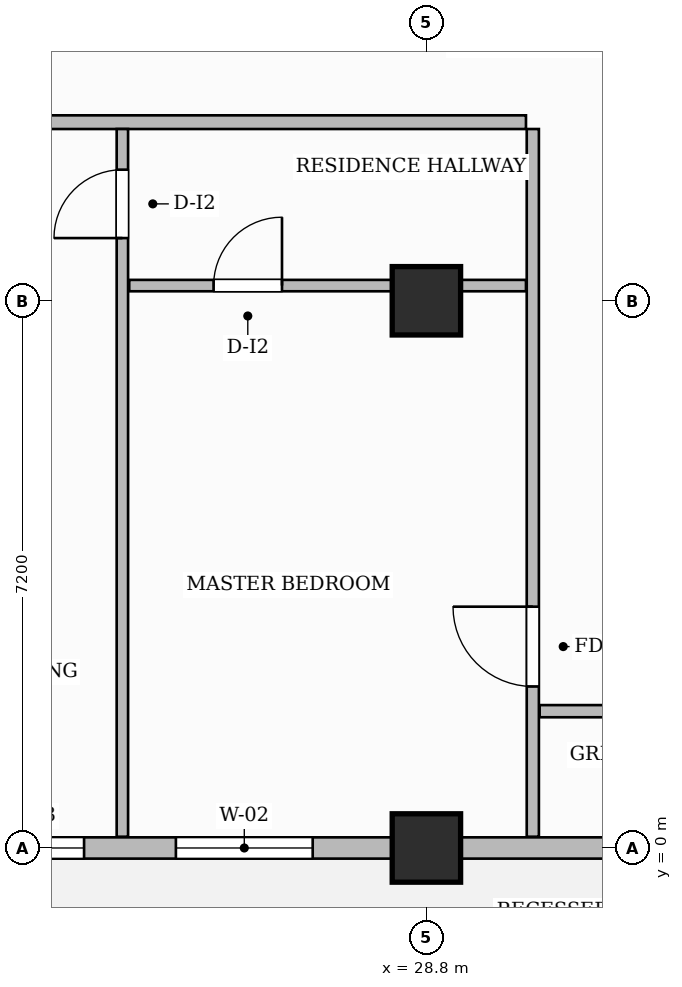
"""IFC4 building model, lengths in metres.
Left out: names, types, materials, properties, quantities, classifications, styles, units other than length and angle.
Written with IfcOpenShell. Run it as: python <this file> out.ifc"""

import sys

from ifc_helpers import new_model, si_unit, direction, frame, frame_2d, origin, origin_2d, place, context, subcontext, project, spatial, rectangle, extrude, source, transform, mapped, element, fill, save


model = new_model("IFC4")
c1 = context("Model", 3, precision=1e-05, world=origin(), true_north=direction((0.0, 1.0)))
c2 = subcontext(c1, "Body", "Model", "MODEL_VIEW")
j1 = project(units=[si_unit("LENGTHUNIT", "METRE"), si_unit("PLANEANGLEUNIT", "RADIAN")], contexts=[c1])
p1 = place(None, origin())
s1 = spatial("IfcSite", under=j1, at=p1, CompositionType="ELEMENT")
p2 = place(p1, origin())
s2 = spatial("IfcBuilding", under=s1, at=p2, CompositionType="ELEMENT")
p3 = place(p2, frame((0.0, 0.0, 244.25)))
s3 = spatial("IfcBuildingStorey", under=s2, at=p3, CompositionType="ELEMENT", Elevation=244.25)
m1 = source(origin(), c2, "Body", "SweptSolid", [
    extrude(rectangle(XDim=0.9, YDim=0.9, at=origin_2d()), origin(), (0.0, 0.0, 1.0), 3.85),
])
for number, where, z_axis, x_axis in (
    (1, (28.8, 0.0, 0.0), (0.0, 0.0, 1.0), (1.0, 0.0, 0.0)),
    (2, (28.8, 7.2, 0.0), (0.0, 0.0, 1.0), (1.0, 0.0, 0.0)),
):
    element("IfcColumn", number, at=place(p3, frame(where, z_axis=z_axis, x_axis=x_axis)), inside=s3, PredefinedType="COLUMN", context=c2, shape_type="MappedRepresentation", body=[
        mapped(m1, transform((0.0, 0.0, 0.0), scale=1.0)),
    ])
p4 = place(p3, frame((14.548, 9.55, 0.0), z_axis=(0.0, 0.0, 1.0), x_axis=(1.0, 0.0, 0.0)))
e3 = element("IfcWall", 3, at=p4, inside=s3, PredefinedType="PARTITIONING", context=c2, shape_type="SweptSolid", body=[
    extrude(rectangle(XDim=15.562, YDim=0.18, at=frame_2d((7.781, 0.0))), origin(), (0.0, 0.0, 1.0), 3.6),
])
p5 = place(p4, frame((2.908, 0.0, 0.0)))
e4 = element("IfcOpeningElement", 4, at=p5, cuts=e3, PredefinedType="OPENING", context=c2, shape_type="SweptSolid", body=[
    extrude(rectangle(XDim=1.0, YDim=2.2, at=frame_2d((0.5, 1.1))), frame((0.0, 0.1, 0.0), z_axis=(0.0, -1.0, 0.0), x_axis=(1.0, 0.0, 0.0)), (0.0, 0.0, 1.0), 0.2),
])
p6 = place(p4, frame((8.232, 0.0, 0.0)))
e5 = element("IfcOpeningElement", 5, at=p6, cuts=e3, PredefinedType="OPENING", context=c2, shape_type="SweptSolid", body=[
    extrude(rectangle(XDim=1.05, YDim=2.25, at=frame_2d((0.525, 1.125))), frame((0.0, 0.1, 0.0), z_axis=(0.0, -1.0, 0.0), x_axis=(1.0, 0.0, 0.0)), (0.0, 0.0, 1.0), 0.2),
])
p7 = place(p3, frame((30.2, 0.148, 0.0), z_axis=(0.0, 0.0, 1.0), x_axis=(0.0, 1.0, 0.0)))
e6 = element("IfcWall", 6, at=p7, inside=s3, PredefinedType="PARTITIONING", context=c2, shape_type="SweptSolid", body=[
    extrude(rectangle(XDim=9.312, YDim=0.16, at=frame_2d((4.656, 0.0))), origin(), (0.0, 0.0, 1.0), 3.6),
])
p8 = place(p7, frame((1.977, 0.0, 0.0)))
e7 = element("IfcOpeningElement", 7, at=p8, cuts=e6, PredefinedType="OPENING", context=c2, shape_type="SweptSolid", body=[
    extrude(rectangle(XDim=1.05, YDim=2.15, at=frame_2d((0.525, 1.075))), frame((0.0, 0.09, 0.0), z_axis=(0.0, -1.0, 0.0), x_axis=(1.0, 0.0, 0.0)), (0.0, 0.0, 1.0), 0.18),
])
p9 = place(p3, frame((30.29, 1.8, 0.0), z_axis=(0.0, 0.0, 1.0), x_axis=(1.0, 0.0, 0.0)))
e8 = element("IfcWall", 8, at=p9, inside=s3, PredefinedType="PARTITIONING", context=c2, shape_type="SweptSolid", body=[
    extrude(rectangle(XDim=19.37, YDim=0.16, at=frame_2d((9.685, 0.0))), origin(), (0.0, 0.0, 1.0), 3.6),
])
p10 = place(p9, frame((9.735, 0.0, 0.0)))
e9 = element("IfcOpeningElement", 9, at=p10, cuts=e8, PredefinedType="OPENING", context=c2, shape_type="SweptSolid", body=[
    extrude(rectangle(XDim=0.95, YDim=2.15, at=frame_2d((0.475, 1.075))), frame((0.0, 0.09, 0.0), z_axis=(0.0, -1.0, 0.0), x_axis=(1.0, 0.0, 0.0)), (0.0, 0.0, 1.0), 0.18),
])
p11 = place(p3, frame((24.8, 0.148, 0.0), z_axis=(0.0, 0.0, 1.0), x_axis=(0.0, 1.0, 0.0)))
e10 = element("IfcWall", 10, at=p11, inside=s3, PredefinedType="PARTITIONING", context=c2, shape_type="SweptSolid", body=[
    extrude(rectangle(XDim=9.312, YDim=0.15, at=frame_2d((4.656, 0.0))), origin(), (0.0, 0.0, 1.0), 3.6),
])
p12 = place(p11, frame((7.877, 0.0, 0.0)))
e11 = element("IfcOpeningElement", 11, at=p12, cuts=e10, PredefinedType="OPENING", context=c2, shape_type="SweptSolid", body=[
    extrude(rectangle(XDim=0.9, YDim=2.15, at=frame_2d((0.45, 1.075))), frame((0.0, 0.085, 0.0), z_axis=(0.0, -1.0, 0.0), x_axis=(1.0, 0.0, 0.0)), (0.0, 0.0, 1.0), 0.17),
])
p13 = place(p3, frame((24.89, 7.4, 0.0), z_axis=(0.0, 0.0, 1.0), x_axis=(1.0, 0.0, 0.0)))
e12 = element("IfcWall", 12, at=p13, inside=s3, PredefinedType="PARTITIONING", context=c2, shape_type="SweptSolid", body=[
    extrude(rectangle(XDim=5.22, YDim=0.15, at=frame_2d((2.61, 0.0))), origin(), (0.0, 0.0, 1.0), 3.135),
])
p14 = place(p13, frame((1.11, 0.0, 0.0)))
e13 = element("IfcOpeningElement", 13, at=p14, cuts=e12, PredefinedType="OPENING", context=c2, shape_type="SweptSolid", body=[
    extrude(rectangle(XDim=0.9, YDim=2.15, at=frame_2d((0.45, 1.075))), frame((0.0, 0.085, 0.0), z_axis=(0.0, -1.0, 0.0), x_axis=(1.0, 0.0, 0.0)), (0.0, 0.0, 1.0), 0.17),
])
p15 = place(p3, frame((14.4, 0.0, 0.0), z_axis=(0.0, 0.0, 1.0), x_axis=(1.0, 0.0, 0.0)))
e14 = element("IfcWall", 14, at=p15, inside=s3, PredefinedType="SOLIDWALL", context=c2, shape_type="SweptSolid", body=[
    extrude(rectangle(XDim=35.4, YDim=0.28, at=frame_2d((17.7, 0.0))), origin(), (0.0, 0.0, 1.0), 3.135),
])
p16 = place(p15, frame((0.85, 0.0, 0.0)))
e15 = element("IfcOpeningElement", 15, at=p16, cuts=e14, PredefinedType="OPENING", context=c2, shape_type="SweptSolid", body=[
    extrude(rectangle(XDim=1.2, YDim=2.2, at=frame_2d((0.6, 1.1))), frame((0.0, 0.15, 0.0), z_axis=(0.0, -1.0, 0.0), x_axis=(1.0, 0.0, 0.0)), (0.0, 0.0, 1.0), 0.3),
])
p17 = place(p15, frame((2.811, 0.0, 0.8)))
e16 = element("IfcOpeningElement", 16, at=p17, cuts=e14, PredefinedType="OPENING", context=c2, shape_type="SweptSolid", body=[
    extrude(rectangle(XDim=1.8, YDim=1.85, at=frame_2d((0.9, 0.925))), frame((0.0, 0.15, 0.0), z_axis=(0.0, -1.0, 0.0), x_axis=(1.0, 0.0, 0.0)), (0.0, 0.0, 1.0), 0.3),
])
p18 = place(p15, frame((5.269, 0.0, 0.8)))
e17 = element("IfcOpeningElement", 17, at=p18, cuts=e14, PredefinedType="OPENING", context=c2, shape_type="SweptSolid", body=[
    extrude(rectangle(XDim=0.95, YDim=1.75, at=frame_2d((0.475, 0.875))), frame((0.0, 0.15, 0.0), z_axis=(0.0, -1.0, 0.0), x_axis=(1.0, 0.0, 0.0)), (0.0, 0.0, 1.0), 0.3),
])
p19 = place(p15, frame((8.496, 0.0, 0.8)))
e18 = element("IfcOpeningElement", 18, at=p19, cuts=e14, PredefinedType="OPENING", context=c2, shape_type="SweptSolid", body=[
    extrude(rectangle(XDim=1.4, YDim=1.85, at=frame_2d((0.7, 0.925))), frame((0.0, 0.15, 0.0), z_axis=(0.0, -1.0, 0.0), x_axis=(1.0, 0.0, 0.0)), (0.0, 0.0, 1.0), 0.3),
])
p20 = place(p15, frame((11.104, 0.0, 0.8)))
e19 = element("IfcOpeningElement", 19, at=p20, cuts=e14, PredefinedType="OPENING", context=c2, shape_type="SweptSolid", body=[
    extrude(rectangle(XDim=1.8, YDim=1.85, at=frame_2d((0.9, 0.925))), frame((0.0, 0.15, 0.0), z_axis=(0.0, -1.0, 0.0), x_axis=(1.0, 0.0, 0.0)), (0.0, 0.0, 1.0), 0.3),
])
p21 = place(p15, frame((16.804, 0.0, 0.8)))
e20 = element("IfcOpeningElement", 20, at=p21, cuts=e14, PredefinedType="OPENING", context=c2, shape_type="SweptSolid", body=[
    extrude(rectangle(XDim=1.8, YDim=1.85, at=frame_2d((0.9, 0.925))), frame((0.0, 0.15, 0.0), z_axis=(0.0, -1.0, 0.0), x_axis=(1.0, 0.0, 0.0)), (0.0, 0.0, 1.0), 0.3),
])
p22 = place(p15, frame((21.725, 0.0, 0.8)))
e21 = element("IfcOpeningElement", 21, at=p22, cuts=e14, PredefinedType="OPENING", context=c2, shape_type="SweptSolid", body=[
    extrude(rectangle(XDim=1.8, YDim=1.85, at=frame_2d((0.9, 0.925))), frame((0.0, 0.15, 0.0), z_axis=(0.0, -1.0, 0.0), x_axis=(1.0, 0.0, 0.0)), (0.0, 0.0, 1.0), 0.3),
])
p23 = place(p15, frame((24.475, 0.0, 0.8)))
e22 = element("IfcOpeningElement", 22, at=p23, cuts=e14, PredefinedType="OPENING", context=c2, shape_type="SweptSolid", body=[
    extrude(rectangle(XDim=1.8, YDim=1.85, at=frame_2d((0.9, 0.925))), frame((0.0, 0.15, 0.0), z_axis=(0.0, -1.0, 0.0), x_axis=(1.0, 0.0, 0.0)), (0.0, 0.0, 1.0), 0.3),
])
p24 = place(p15, frame((29.075, 0.0, 0.8)))
e23 = element("IfcOpeningElement", 23, at=p24, cuts=e14, PredefinedType="OPENING", context=c2, shape_type="SweptSolid", body=[
    extrude(rectangle(XDim=1.8, YDim=1.85, at=frame_2d((0.9, 0.925))), frame((0.0, 0.15, 0.0), z_axis=(0.0, -1.0, 0.0), x_axis=(1.0, 0.0, 0.0)), (0.0, 0.0, 1.0), 0.3),
])
p25 = place(p15, frame((32.125, 0.0, 0.8)))
e24 = element("IfcOpeningElement", 24, at=p25, cuts=e14, PredefinedType="OPENING", context=c2, shape_type="SweptSolid", body=[
    extrude(rectangle(XDim=1.8, YDim=1.85, at=frame_2d((0.9, 0.925))), frame((0.0, 0.15, 0.0), z_axis=(0.0, -1.0, 0.0), x_axis=(1.0, 0.0, 0.0)), (0.0, 0.0, 1.0), 0.3),
])
m2 = source(origin(), c2, "Body", "SweptSolid", [
    extrude(rectangle(XDim=1.05, YDim=2.15, at=frame_2d((0.525, 1.075))), frame((0.0, 0.025, 0.0), z_axis=(0.0, -1.0, 0.0), x_axis=(1.0, 0.0, 0.0)), (0.0, 0.0, 1.0), 0.05),
])
p26 = place(p8, origin())
e25 = element("IfcDoor", 25, at=p26, inside=s3, OperationType="SINGLE_SWING_RIGHT", PredefinedType="DOOR", context=c2, shape_type="MappedRepresentation", body=[
    mapped(m2, transform((0.0, 0.0, 0.0), scale=1.0)),
])
fill(e7, e25)
m3 = source(origin(), c2, "Body", "SweptSolid", [
    extrude(rectangle(XDim=0.9, YDim=2.15, at=frame_2d((0.45, 1.075))), frame((0.0, 0.025, 0.0), z_axis=(0.0, -1.0, 0.0), x_axis=(1.0, 0.0, 0.0)), (0.0, 0.0, 1.0), 0.05),
])
p27 = place(p12, origin())
e26 = element("IfcDoor", 26, at=p27, inside=s3, OperationType="SINGLE_SWING_LEFT", PredefinedType="DOOR", context=c2, shape_type="MappedRepresentation", body=[
    mapped(m3, transform((0.0, 0.0, 0.0), scale=1.0)),
])
fill(e11, e26)
p28 = place(p14, origin())
e27 = element("IfcDoor", 27, at=p28, inside=s3, OperationType="SINGLE_SWING_RIGHT", PredefinedType="DOOR", context=c2, shape_type="MappedRepresentation", body=[
    mapped(m3, transform((0.0, 0.0, 0.0), scale=1.0)),
])
fill(e13, e27)
m4 = source(origin(), c2, "Body", "SweptSolid", [
    extrude(rectangle(XDim=1.4, YDim=1.85, at=frame_2d((0.7, 0.925))), frame((0.0, 0.03, 0.0), z_axis=(0.0, -1.0, 0.0), x_axis=(1.0, 0.0, 0.0)), (0.0, 0.0, 1.0), 0.06),
])
p29 = place(p19, origin())
e28 = element("IfcWindow", 28, at=p29, inside=s3, PartitioningType="SINGLE_PANEL", PredefinedType="WINDOW", context=c2, shape_type="MappedRepresentation", body=[
    mapped(m4, transform((0.0, 0.0, 0.0), scale=1.0)),
])
fill(e18, e28)
m5 = source(origin(), c2, "Body", "SweptSolid", [
    extrude(rectangle(XDim=1.8, YDim=1.85, at=frame_2d((0.9, 0.925))), frame((0.0, 0.03, 0.0), z_axis=(0.0, -1.0, 0.0), x_axis=(1.0, 0.0, 0.0)), (0.0, 0.0, 1.0), 0.06),
])
p30 = place(p20, origin())
e29 = element("IfcWindow", 29, at=p30, inside=s3, PartitioningType="DOUBLE_PANEL_VERTICAL", PredefinedType="WINDOW", context=c2, shape_type="MappedRepresentation", body=[
    mapped(m5, transform((0.0, 0.0, 0.0), scale=1.0)),
])
fill(e19, e29)
save(model, sys.argv[1])
